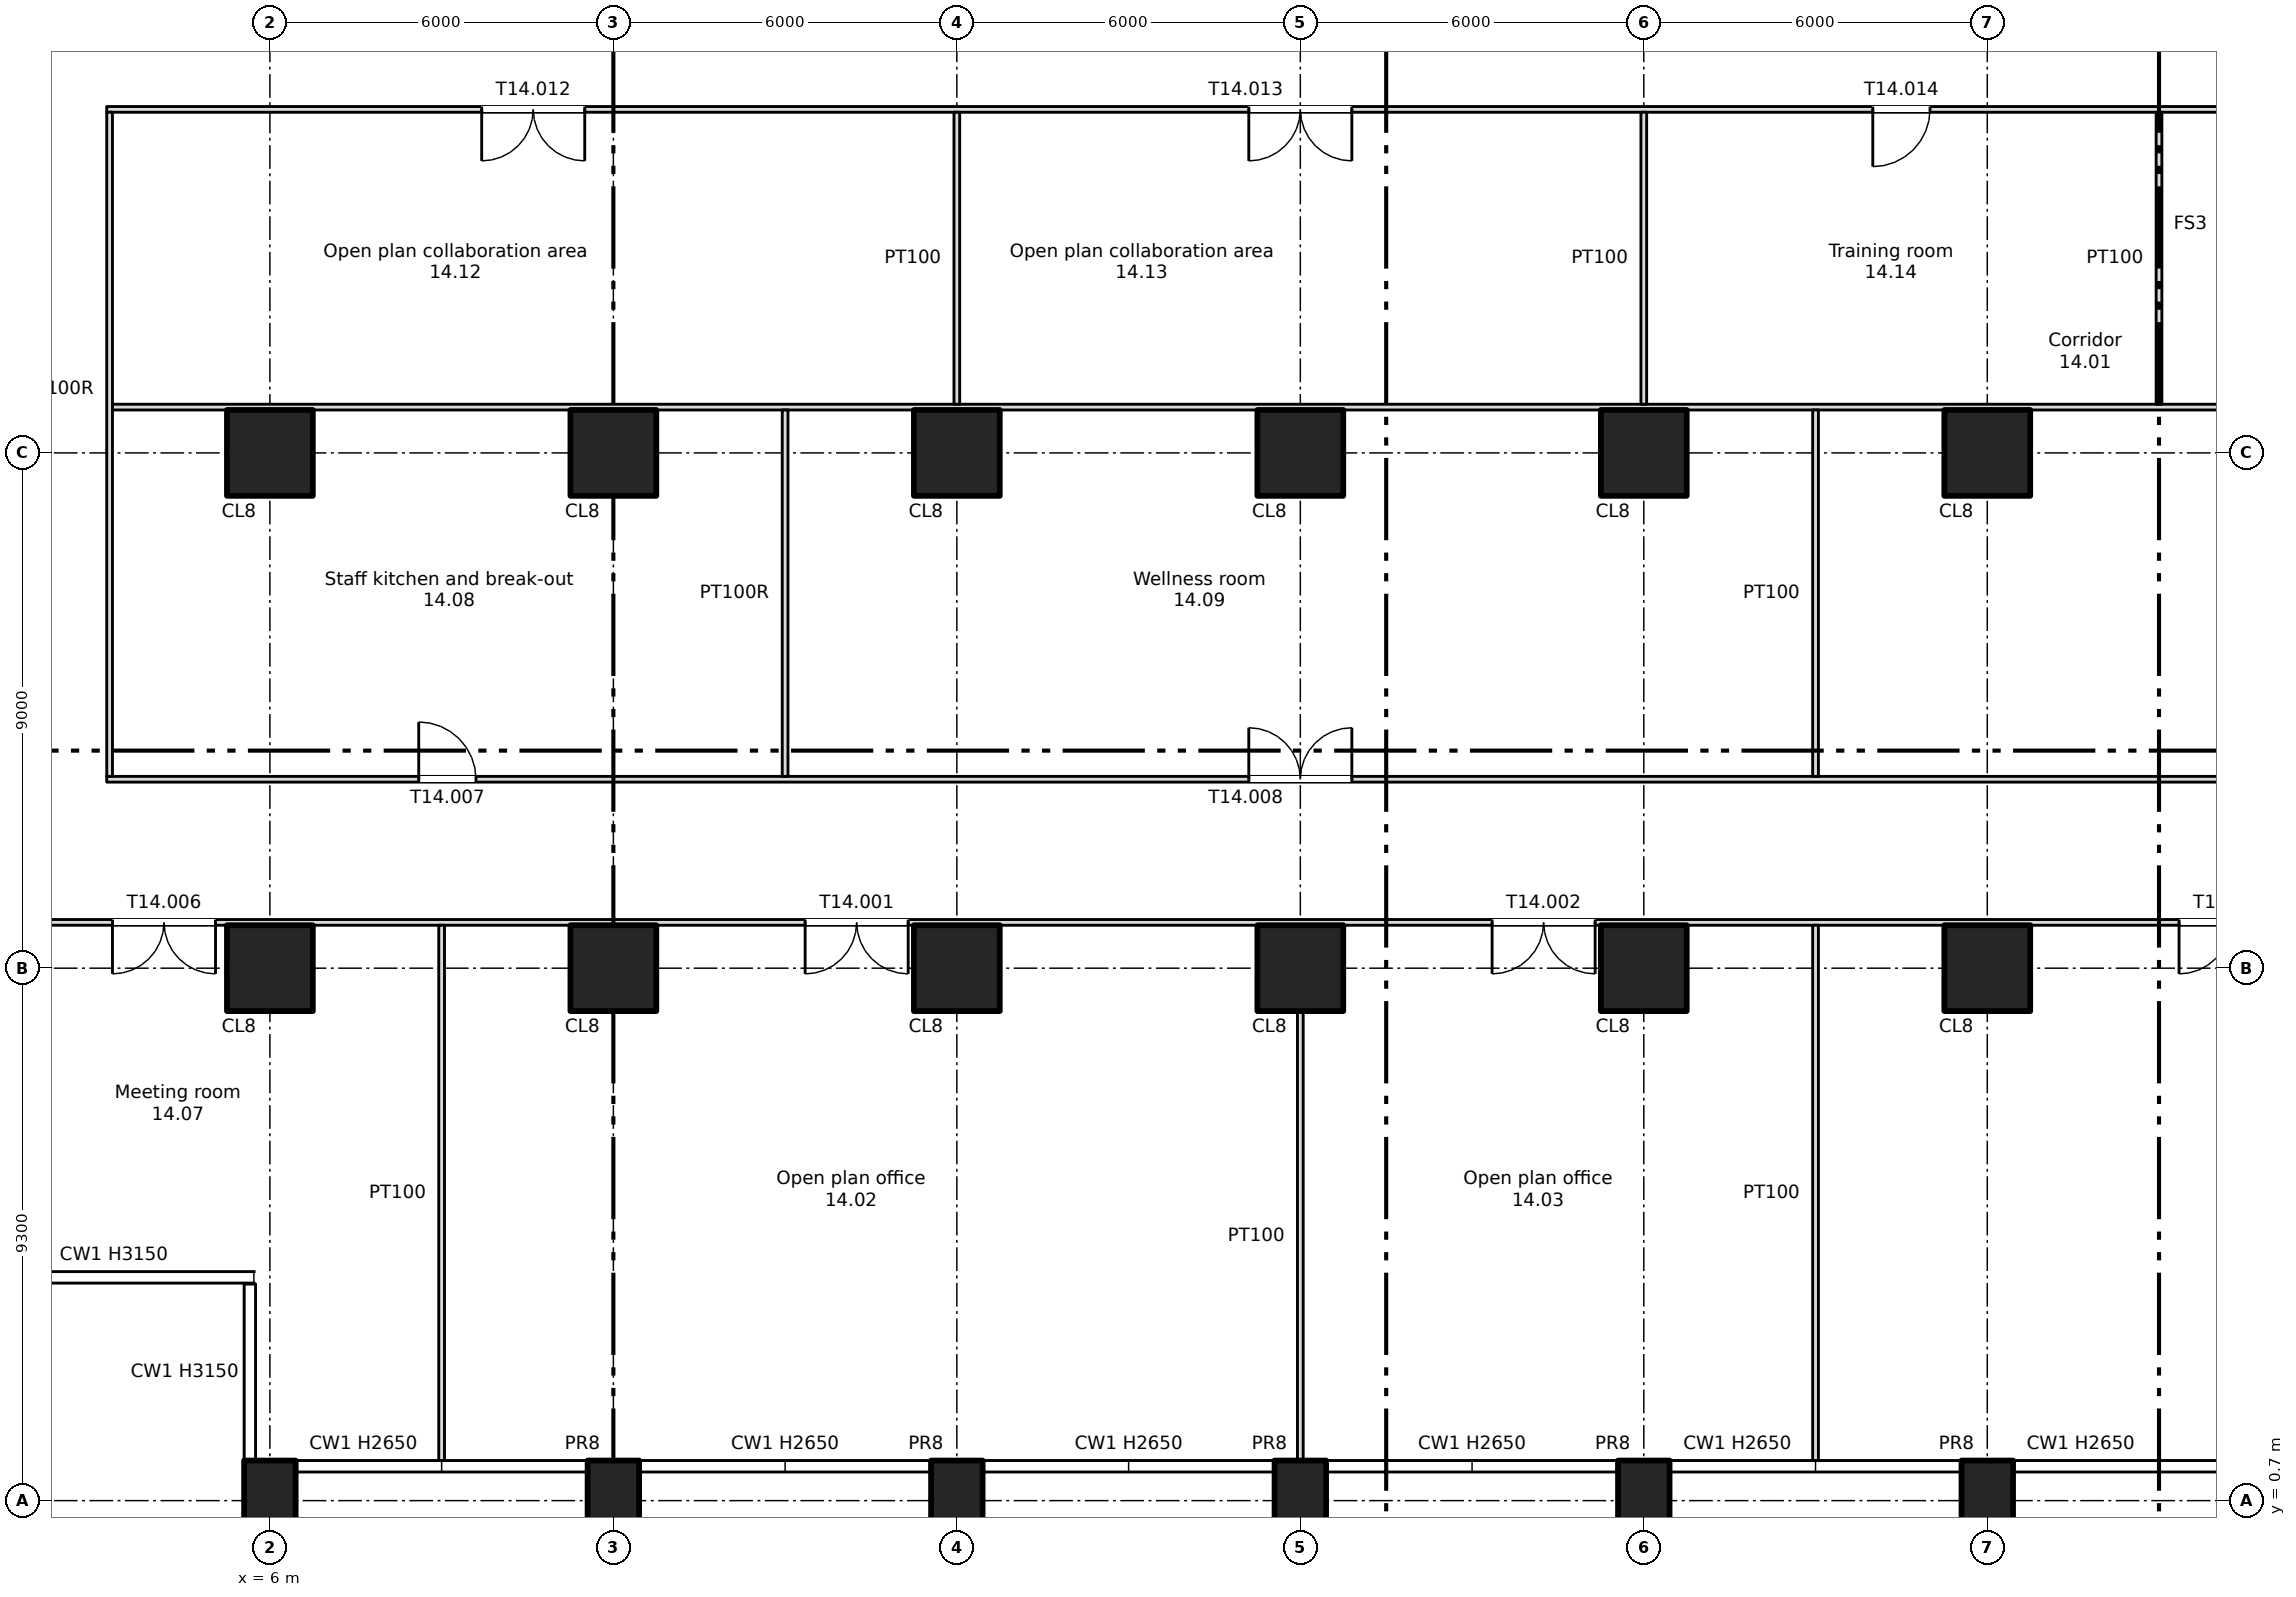
"""IFC4 building model, lengths in metres.
Left out: names, types, materials, properties, quantities, classifications, styles, units other than length and angle.
Written with IfcOpenShell. Run it as: python <this file> out.ifc"""

import sys

from ifc_helpers import new_model, si_unit, direction, frame, frame_2d, origin, origin_2d, place, context, subcontext, project, spatial, rectangle, extrude, element, fill, save


model = new_model("IFC4")
c1 = context("Model", 3, precision=1e-05, world=origin(), true_north=direction((0.0, 1.0)))
c2 = subcontext(c1, "Body", "Model", "MODEL_VIEW")
j1 = project(units=[si_unit("LENGTHUNIT", "METRE"), si_unit("PLANEANGLEUNIT", "RADIAN")], contexts=[c1])
p1 = place(None, origin())
s1 = spatial("IfcSite", under=j1, at=p1, CompositionType="ELEMENT")
p2 = place(p1, origin())
s2 = spatial("IfcBuilding", under=s1, at=p2, CompositionType="ELEMENT")
p3 = place(p2, frame((0.0, 0.0, 86.25)))
s3 = spatial("IfcBuildingStorey", under=s2, at=p3, CompositionType="ELEMENT", Elevation=86.25)
for number, where, z_axis, x_axis in (
    (1, (6.0, 0.7, -0.4), (0.0, 0.0, 1.0), (1.0, 0.0, 0.0)),
    (2, (12.0, 0.7, -0.4), (0.0, 0.0, 1.0), (1.0, 0.0, 0.0)),
    (3, (18.0, 0.7, -0.4), (0.0, 0.0, 1.0), (1.0, 0.0, 0.0)),
    (4, (24.0, 0.7, -0.4), (0.0, 0.0, 1.0), (1.0, 0.0, 0.0)),
    (5, (30.0, 0.7, -0.4), (0.0, 0.0, 1.0), (1.0, 0.0, 0.0)),
    (6, (36.0, 0.7, -0.4), (0.0, 0.0, 1.0), (1.0, 0.0, 0.0)),
):
    element("IfcColumn", number, at=place(p3, frame(where, z_axis=z_axis, x_axis=x_axis)), inside=s3, PredefinedType="COLUMN", context=c2, shape_type="SweptSolid", body=[
        extrude(rectangle(XDim=0.9, YDim=1.4, at=origin_2d()), origin(), (0.0, 0.0, 1.0), 3.55),
    ])
for number, where, z_axis, x_axis in (
    (7, (6.0, 10.0, 0.0), (0.0, 0.0, 1.0), (1.0, 0.0, 0.0)),
    (8, (6.0, 19.0, 0.0), (0.0, 0.0, 1.0), (1.0, 0.0, 0.0)),
    (9, (12.0, 10.0, 0.0), (0.0, 0.0, 1.0), (1.0, 0.0, 0.0)),
    (10, (12.0, 19.0, 0.0), (0.0, 0.0, 1.0), (1.0, 0.0, 0.0)),
    (11, (18.0, 10.0, 0.0), (0.0, 0.0, 1.0), (1.0, 0.0, 0.0)),
    (12, (18.0, 19.0, 0.0), (0.0, 0.0, 1.0), (1.0, 0.0, 0.0)),
    (13, (24.0, 10.0, 0.0), (0.0, 0.0, 1.0), (1.0, 0.0, 0.0)),
    (14, (24.0, 19.0, 0.0), (0.0, 0.0, 1.0), (1.0, 0.0, 0.0)),
    (15, (30.0, 10.0, 0.0), (0.0, 0.0, 1.0), (1.0, 0.0, 0.0)),
    (16, (30.0, 19.0, 0.0), (0.0, 0.0, 1.0), (1.0, 0.0, 0.0)),
    (17, (36.0, 10.0, 0.0), (0.0, 0.0, 1.0), (1.0, 0.0, 0.0)),
    (18, (36.0, 19.0, 0.0), (0.0, 0.0, 1.0), (1.0, 0.0, 0.0)),
):
    element("IfcColumn", number, at=place(p3, frame(where, z_axis=z_axis, x_axis=x_axis)), inside=s3, PredefinedType="COLUMN", context=c2, shape_type="SweptSolid", body=[
        extrude(rectangle(XDim=1.5, YDim=1.5, at=origin_2d()), origin(), (0.0, 0.0, 1.0), 3.15),
    ])
p4 = place(p3, frame((0.8, 10.8, 0.0), z_axis=(0.0, 0.0, 1.0), x_axis=(1.0, 0.0, 0.0)))
e19 = element("IfcWall", 19, at=p4, inside=s3, PredefinedType="PARTITIONING", context=c2, shape_type="SweptSolid", body=[
    extrude(rectangle(XDim=76.4, YDim=0.1, at=frame_2d((38.2, 0.0))), origin(), (0.0, 0.0, 1.0), 3.15),
])
p5 = place(p4, frame((14.55, 0.0, 0.0)))
e20 = element("IfcOpeningElement", 20, at=p5, cuts=e19, PredefinedType="OPENING", context=c2, shape_type="SweptSolid", body=[
    extrude(rectangle(XDim=1.8, YDim=2.1, at=frame_2d((0.9, 1.05))), frame((0.0, 0.06, 0.0), z_axis=(0.0, -1.0, 0.0), x_axis=(1.0, 0.0, 0.0)), (0.0, 0.0, 1.0), 0.12),
])
p6 = place(p4, frame((26.55, 0.0, 0.0)))
e21 = element("IfcOpeningElement", 21, at=p6, cuts=e19, PredefinedType="OPENING", context=c2, shape_type="SweptSolid", body=[
    extrude(rectangle(XDim=1.8, YDim=2.1, at=frame_2d((0.9, 1.05))), frame((0.0, 0.06, 0.0), z_axis=(0.0, -1.0, 0.0), x_axis=(1.0, 0.0, 0.0)), (0.0, 0.0, 1.0), 0.12),
])
p7 = place(p4, frame((38.55, 0.0, 0.0)))
e22 = element("IfcOpeningElement", 22, at=p7, cuts=e19, PredefinedType="OPENING", context=c2, shape_type="SweptSolid", body=[
    extrude(rectangle(XDim=1.8, YDim=2.1, at=frame_2d((0.9, 1.05))), frame((0.0, 0.06, 0.0), z_axis=(0.0, -1.0, 0.0), x_axis=(1.0, 0.0, 0.0)), (0.0, 0.0, 1.0), 0.12),
])
p8 = place(p4, frame((54.05, 0.0, 0.0)))
e23 = element("IfcOpeningElement", 23, at=p8, cuts=e19, PredefinedType="OPENING", context=c2, shape_type="SweptSolid", body=[
    extrude(rectangle(XDim=1.8, YDim=2.1, at=frame_2d((0.9, 1.05))), frame((0.0, 0.06, 0.0), z_axis=(0.0, -1.0, 0.0), x_axis=(1.0, 0.0, 0.0)), (0.0, 0.0, 1.0), 0.12),
])
p9 = place(p4, frame((68.4, 0.0, 0.0)))
e24 = element("IfcOpeningElement", 24, at=p9, cuts=e19, PredefinedType="OPENING", context=c2, shape_type="SweptSolid", body=[
    extrude(rectangle(XDim=1.8, YDim=2.1, at=frame_2d((0.9, 1.05))), frame((0.0, 0.06, 0.0), z_axis=(0.0, -1.0, 0.0), x_axis=(1.0, 0.0, 0.0)), (0.0, 0.0, 1.0), 0.12),
])
p10 = place(p4, frame((2.45, 0.0, 0.0)))
e25 = element("IfcOpeningElement", 25, at=p10, cuts=e19, PredefinedType="OPENING", context=c2, shape_type="SweptSolid", body=[
    extrude(rectangle(XDim=1.8, YDim=2.1, at=frame_2d((0.9, 1.05))), frame((0.0, 0.06, 0.0), z_axis=(0.0, -1.0, 0.0), x_axis=(1.0, 0.0, 0.0)), (0.0, 0.0, 1.0), 0.12),
])
p11 = place(p3, frame((3.15, 13.3, 0.0), z_axis=(0.0, 0.0, 1.0), x_axis=(1.0, 0.0, 0.0)))
e26 = element("IfcWall", 26, at=p11, inside=s3, PredefinedType="PARTITIONING", context=c2, shape_type="SweptSolid", body=[
    extrude(rectangle(XDim=71.7, YDim=0.1, at=frame_2d((35.85, 0.0))), origin(), (0.0, 0.0, 1.0), 3.15),
])
p12 = place(p11, frame((5.45, 0.0, 0.0)))
e27 = element("IfcOpeningElement", 27, at=p12, cuts=e26, PredefinedType="OPENING", context=c2, shape_type="SweptSolid", body=[
    extrude(rectangle(XDim=1.0, YDim=2.1, at=frame_2d((0.5, 1.05))), frame((0.0, 0.06, 0.0), z_axis=(0.0, -1.0, 0.0), x_axis=(1.0, 0.0, 0.0)), (0.0, 0.0, 1.0), 0.12),
])
p13 = place(p11, frame((19.95, 0.0, 0.0)))
e28 = element("IfcOpeningElement", 28, at=p13, cuts=e26, PredefinedType="OPENING", context=c2, shape_type="SweptSolid", body=[
    extrude(rectangle(XDim=1.8, YDim=2.1, at=frame_2d((0.9, 1.05))), frame((0.0, 0.06, 0.0), z_axis=(0.0, -1.0, 0.0), x_axis=(1.0, 0.0, 0.0)), (0.0, 0.0, 1.0), 0.12),
])
p14 = place(p11, frame((37.95, 0.0, 0.0)))
e29 = element("IfcOpeningElement", 29, at=p14, cuts=e26, PredefinedType="OPENING", context=c2, shape_type="SweptSolid", body=[
    extrude(rectangle(XDim=1.8, YDim=2.1, at=frame_2d((0.9, 1.05))), frame((0.0, 0.06, 0.0), z_axis=(0.0, -1.0, 0.0), x_axis=(1.0, 0.0, 0.0)), (0.0, 0.0, 1.0), 0.12),
])
p15 = place(p11, frame((53.2, 0.0, 0.0)))
e30 = element("IfcOpeningElement", 30, at=p15, cuts=e26, PredefinedType="OPENING", context=c2, shape_type="SweptSolid", body=[
    extrude(rectangle(XDim=1.2, YDim=2.1, at=frame_2d((0.6, 1.05))), frame((0.0, 0.06, 0.0), z_axis=(0.0, -1.0, 0.0), x_axis=(1.0, 0.0, 0.0)), (0.0, 0.0, 1.0), 0.12),
])
p16 = place(p11, frame((65.1, 0.0, 0.0)))
e31 = element("IfcOpeningElement", 31, at=p16, cuts=e26, PredefinedType="OPENING", context=c2, shape_type="SweptSolid", body=[
    extrude(rectangle(XDim=1.2, YDim=2.1, at=frame_2d((0.6, 1.05))), frame((0.0, 0.06, 0.0), z_axis=(0.0, -1.0, 0.0), x_axis=(1.0, 0.0, 0.0)), (0.0, 0.0, 1.0), 0.12),
])
p17 = place(p3, frame((3.25, 19.8, 0.0), z_axis=(0.0, 0.0, 1.0), x_axis=(1.0, 0.0, 0.0)))
e32 = element("IfcWall", 32, at=p17, inside=s3, PredefinedType="PARTITIONING", context=c2, shape_type="SweptSolid", body=[
    extrude(rectangle(XDim=71.5, YDim=0.1, at=frame_2d((35.75, 0.0))), origin(), (0.0, 0.0, 1.0), 3.15),
])
p18 = place(p3, frame((3.15, 25.0, 0.0), z_axis=(0.0, 0.0, 1.0), x_axis=(1.0, 0.0, 0.0)))
e33 = element("IfcWall", 33, at=p18, inside=s3, PredefinedType="PARTITIONING", context=c2, shape_type="SweptSolid", body=[
    extrude(rectangle(XDim=71.7, YDim=0.1, at=frame_2d((35.85, 0.0))), origin(), (0.0, 0.0, 1.0), 3.15),
])
p19 = place(p18, frame((6.55, 0.0, 0.0)))
e34 = element("IfcOpeningElement", 34, at=p19, cuts=e33, PredefinedType="OPENING", context=c2, shape_type="SweptSolid", body=[
    extrude(rectangle(XDim=1.8, YDim=2.1, at=frame_2d((0.9, 1.05))), frame((0.0, 0.06, 0.0), z_axis=(0.0, -1.0, 0.0), x_axis=(1.0, 0.0, 0.0)), (0.0, 0.0, 1.0), 0.12),
])
p20 = place(p18, frame((19.95, 0.0, 0.0)))
e35 = element("IfcOpeningElement", 35, at=p20, cuts=e33, PredefinedType="OPENING", context=c2, shape_type="SweptSolid", body=[
    extrude(rectangle(XDim=1.8, YDim=2.1, at=frame_2d((0.9, 1.05))), frame((0.0, 0.06, 0.0), z_axis=(0.0, -1.0, 0.0), x_axis=(1.0, 0.0, 0.0)), (0.0, 0.0, 1.0), 0.12),
])
p21 = place(p18, frame((30.85, 0.0, 0.0)))
e36 = element("IfcOpeningElement", 36, at=p21, cuts=e33, PredefinedType="OPENING", context=c2, shape_type="SweptSolid", body=[
    extrude(rectangle(XDim=1.0, YDim=2.1, at=frame_2d((0.5, 1.05))), frame((0.0, 0.06, 0.0), z_axis=(0.0, -1.0, 0.0), x_axis=(1.0, 0.0, 0.0)), (0.0, 0.0, 1.0), 0.12),
])
p22 = place(p18, frame((45.45, 0.0, 0.0)))
e37 = element("IfcOpeningElement", 37, at=p22, cuts=e33, PredefinedType="OPENING", context=c2, shape_type="SweptSolid", body=[
    extrude(rectangle(XDim=1.8, YDim=2.1, at=frame_2d((0.9, 1.05))), frame((0.0, 0.06, 0.0), z_axis=(0.0, -1.0, 0.0), x_axis=(1.0, 0.0, 0.0)), (0.0, 0.0, 1.0), 0.12),
])
p23 = place(p18, frame((63.35, 0.0, 0.0)))
e38 = element("IfcOpeningElement", 38, at=p23, cuts=e33, PredefinedType="OPENING", context=c2, shape_type="SweptSolid", body=[
    extrude(rectangle(XDim=1.8, YDim=2.1, at=frame_2d((0.9, 1.05))), frame((0.0, 0.06, 0.0), z_axis=(0.0, -1.0, 0.0), x_axis=(1.0, 0.0, 0.0)), (0.0, 0.0, 1.0), 0.12),
])
p24 = place(p3, frame((3.2, 13.35, 0.0), z_axis=(0.0, 0.0, 1.0), x_axis=(0.0, 1.0, 0.0)))
e39 = element("IfcWall", 39, at=p24, inside=s3, PredefinedType="PARTITIONING", context=c2, shape_type="SweptSolid", body=[
    extrude(rectangle(XDim=11.6, YDim=0.1, at=frame_2d((5.8, 0.0))), origin(), (0.0, 0.0, 1.0), 3.15),
])
p25 = place(p3, frame((9.0, 1.4, 0.0), z_axis=(0.0, 0.0, 1.0), x_axis=(0.0, 1.0, 0.0)))
e40 = element("IfcWall", 40, at=p25, inside=s3, PredefinedType="PARTITIONING", context=c2, shape_type="SweptSolid", body=[
    extrude(rectangle(XDim=9.35, YDim=0.1, at=frame_2d((4.675, 0.0))), origin(), (0.0, 0.0, 1.0), 3.15),
])
p26 = place(p3, frame((15.0, 13.35, 0.0), z_axis=(0.0, 0.0, 1.0), x_axis=(0.0, 1.0, 0.0)))
e41 = element("IfcWall", 41, at=p26, inside=s3, PredefinedType="PARTITIONING", context=c2, shape_type="SweptSolid", body=[
    extrude(rectangle(XDim=6.4, YDim=0.1, at=frame_2d((3.2, 0.0))), origin(), (0.0, 0.0, 1.0), 3.15),
])
p27 = place(p3, frame((18.0, 19.85, 0.0), z_axis=(0.0, 0.0, 1.0), x_axis=(0.0, 1.0, 0.0)))
e42 = element("IfcWall", 42, at=p27, inside=s3, PredefinedType="PARTITIONING", context=c2, shape_type="SweptSolid", body=[
    extrude(rectangle(XDim=5.1, YDim=0.1, at=frame_2d((2.55, 0.0))), origin(), (0.0, 0.0, 1.0), 3.15),
])
p28 = place(p3, frame((24.0, 1.4, 0.0), z_axis=(0.0, 0.0, 1.0), x_axis=(0.0, 1.0, 0.0)))
e43 = element("IfcWall", 43, at=p28, inside=s3, PredefinedType="PARTITIONING", context=c2, shape_type="SweptSolid", body=[
    extrude(rectangle(XDim=7.85, YDim=0.1, at=frame_2d((3.925, 0.0))), origin(), (0.0, 0.0, 1.0), 3.15),
])
p29 = place(p3, frame((30.0, 19.85, 0.0), z_axis=(0.0, 0.0, 1.0), x_axis=(0.0, 1.0, 0.0)))
e44 = element("IfcWall", 44, at=p29, inside=s3, PredefinedType="PARTITIONING", context=c2, shape_type="SweptSolid", body=[
    extrude(rectangle(XDim=5.1, YDim=0.1, at=frame_2d((2.55, 0.0))), origin(), (0.0, 0.0, 1.0), 3.15),
])
p30 = place(p3, frame((33.0, 1.4, 0.0), z_axis=(0.0, 0.0, 1.0), x_axis=(0.0, 1.0, 0.0)))
e45 = element("IfcWall", 45, at=p30, inside=s3, PredefinedType="PARTITIONING", context=c2, shape_type="SweptSolid", body=[
    extrude(rectangle(XDim=9.35, YDim=0.1, at=frame_2d((4.675, 0.0))), origin(), (0.0, 0.0, 1.0), 3.15),
])
p31 = place(p3, frame((33.0, 13.35, 0.0), z_axis=(0.0, 0.0, 1.0), x_axis=(0.0, 1.0, 0.0)))
e46 = element("IfcWall", 46, at=p31, inside=s3, PredefinedType="PARTITIONING", context=c2, shape_type="SweptSolid", body=[
    extrude(rectangle(XDim=6.4, YDim=0.1, at=frame_2d((3.2, 0.0))), origin(), (0.0, 0.0, 1.0), 3.15),
])
p32 = place(p3, frame((39.0, 19.85, 0.0), z_axis=(0.0, 0.0, 1.0), x_axis=(0.0, 1.0, 0.0)))
e47 = element("IfcWall", 47, at=p32, inside=s3, PredefinedType="PARTITIONING", context=c2, shape_type="SweptSolid", body=[
    extrude(rectangle(XDim=5.1, YDim=0.1, at=frame_2d((2.55, 0.0))), origin(), (0.0, 0.0, 1.0), 3.15),
])
p33 = place(p5, origin())
e48 = element("IfcDoor", 48, at=p33, inside=s3, OperationType="DOUBLE_DOOR_SINGLE_SWING", PredefinedType="DOOR", context=c2, shape_type="SweptSolid", body=[
    extrude(rectangle(XDim=1.8, YDim=2.1, at=frame_2d((0.9, 1.05))), frame((0.0, 0.025, 0.0), z_axis=(0.0, -1.0, 0.0), x_axis=(1.0, 0.0, 0.0)), (0.0, 0.0, 1.0), 0.05),
])
fill(e20, e48)
p34 = place(p6, origin())
e49 = element("IfcDoor", 49, at=p34, inside=s3, OperationType="DOUBLE_DOOR_SINGLE_SWING", PredefinedType="DOOR", context=c2, shape_type="SweptSolid", body=[
    extrude(rectangle(XDim=1.8, YDim=2.1, at=frame_2d((0.9, 1.05))), frame((0.0, 0.025, 0.0), z_axis=(0.0, -1.0, 0.0), x_axis=(1.0, 0.0, 0.0)), (0.0, 0.0, 1.0), 0.05),
])
fill(e21, e49)
p35 = place(p7, origin())
e50 = element("IfcDoor", 50, at=p35, inside=s3, OperationType="DOUBLE_DOOR_SINGLE_SWING", PredefinedType="DOOR", context=c2, shape_type="SweptSolid", body=[
    extrude(rectangle(XDim=1.8, YDim=2.1, at=frame_2d((0.9, 1.05))), frame((0.0, 0.025, 0.0), z_axis=(0.0, -1.0, 0.0), x_axis=(1.0, 0.0, 0.0)), (0.0, 0.0, 1.0), 0.05),
])
fill(e22, e50)
p36 = place(p10, origin())
e51 = element("IfcDoor", 51, at=p36, inside=s3, OperationType="DOUBLE_DOOR_SINGLE_SWING", PredefinedType="DOOR", context=c2, shape_type="SweptSolid", body=[
    extrude(rectangle(XDim=1.8, YDim=2.1, at=frame_2d((0.9, 1.05))), frame((0.0, 0.025, 0.0), z_axis=(0.0, -1.0, 0.0), x_axis=(1.0, 0.0, 0.0)), (0.0, 0.0, 1.0), 0.05),
])
fill(e25, e51)
p37 = place(p12, origin())
e52 = element("IfcDoor", 52, at=p37, inside=s3, OperationType="SINGLE_SWING_LEFT", PredefinedType="DOOR", context=c2, shape_type="SweptSolid", body=[
    extrude(rectangle(XDim=1.0, YDim=2.1, at=frame_2d((0.5, 1.05))), frame((0.0, 0.025, 0.0), z_axis=(0.0, -1.0, 0.0), x_axis=(1.0, 0.0, 0.0)), (0.0, 0.0, 1.0), 0.05),
])
fill(e27, e52)
p38 = place(p13, origin())
e53 = element("IfcDoor", 53, at=p38, inside=s3, OperationType="DOUBLE_DOOR_SINGLE_SWING", PredefinedType="DOOR", context=c2, shape_type="SweptSolid", body=[
    extrude(rectangle(XDim=1.8, YDim=2.1, at=frame_2d((0.9, 1.05))), frame((0.0, 0.025, 0.0), z_axis=(0.0, -1.0, 0.0), x_axis=(1.0, 0.0, 0.0)), (0.0, 0.0, 1.0), 0.05),
])
fill(e28, e53)
p39 = place(p19, origin())
e54 = element("IfcDoor", 54, at=p39, inside=s3, OperationType="DOUBLE_DOOR_SINGLE_SWING", PredefinedType="DOOR", context=c2, shape_type="SweptSolid", body=[
    extrude(rectangle(XDim=1.8, YDim=2.1, at=frame_2d((0.9, 1.05))), frame((0.0, 0.025, 0.0), z_axis=(0.0, -1.0, 0.0), x_axis=(1.0, 0.0, 0.0)), (0.0, 0.0, 1.0), 0.05),
])
fill(e34, e54)
p40 = place(p20, origin())
e55 = element("IfcDoor", 55, at=p40, inside=s3, OperationType="DOUBLE_DOOR_SINGLE_SWING", PredefinedType="DOOR", context=c2, shape_type="SweptSolid", body=[
    extrude(rectangle(XDim=1.8, YDim=2.1, at=frame_2d((0.9, 1.05))), frame((0.0, 0.025, 0.0), z_axis=(0.0, -1.0, 0.0), x_axis=(1.0, 0.0, 0.0)), (0.0, 0.0, 1.0), 0.05),
])
fill(e35, e55)
p41 = place(p21, origin())
e56 = element("IfcDoor", 56, at=p41, inside=s3, OperationType="SINGLE_SWING_LEFT", PredefinedType="DOOR", context=c2, shape_type="SweptSolid", body=[
    extrude(rectangle(XDim=1.0, YDim=2.1, at=frame_2d((0.5, 1.05))), frame((0.0, 0.025, 0.0), z_axis=(0.0, -1.0, 0.0), x_axis=(1.0, 0.0, 0.0)), (0.0, 0.0, 1.0), 0.05),
])
fill(e36, e56)
save(model, sys.argv[1])
